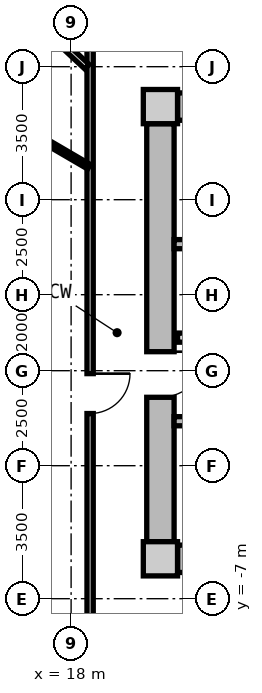
"""IFC4 building model, lengths in metres.
Left out: names, types, materials, properties, quantities, classifications, styles, units other than length and angle.
Written with IfcOpenShell. Run it as: python <this file> out.ifc"""

import sys

from ifc_helpers import new_model, si_unit, direction, frame, frame_2d, origin, origin_2d, place, context, subcontext, project, spatial, rectangle, extrude, source, transform, mapped, element, fill, save


model = new_model("IFC4")
c1 = context("Model", 3, precision=1e-05, world=origin(), true_north=direction((0.0, 1.0)))
c2 = subcontext(c1, "Body", "Model", "MODEL_VIEW")
j1 = project(units=[si_unit("LENGTHUNIT", "METRE"), si_unit("PLANEANGLEUNIT", "RADIAN")], contexts=[c1])
p1 = place(None, origin())
s1 = spatial("IfcSite", under=j1, at=p1, CompositionType="ELEMENT")
p2 = place(p1, origin())
s2 = spatial("IfcBuilding", under=s1, at=p2, CompositionType="ELEMENT")
p3 = place(p2, frame((0.0, 0.0, 93.2)))
s3 = spatial("IfcBuildingStorey", under=s2, at=p3, CompositionType="ELEMENT", Elevation=93.2)
m1 = source(origin(), c2, "Body", "SweptSolid", [
    extrude(rectangle(XDim=0.9, YDim=0.9, at=origin_2d()), origin(), (0.0, 0.0, 1.0), 3.05),
])
for number, where, z_axis, x_axis in (
    (1, (20.35, -5.95, 0.0), (0.0, 0.0, 1.0), (1.0, 0.0, 0.0)),
    (2, (20.35, 5.95, 0.0), (0.0, 0.0, 1.0), (1.0, 0.0, 0.0)),
):
    element("IfcColumn", number, at=place(p3, frame(where, z_axis=z_axis, x_axis=x_axis)), inside=s3, PredefinedType="COLUMN", context=c2, shape_type="MappedRepresentation", body=[
        mapped(m1, transform((0.0, 0.0, 0.0), x_axis=(1.0, 0.0, 0.0), y_axis=(0.0, 1.0, 0.0), z_axis=(0.0, 0.0, 1.0), scale=1.0)),
    ])
m2 = source(origin(), c2, "Body", "SweptSolid", [
    extrude(rectangle(XDim=14.4, YDim=0.72, at=frame_2d((7.2, 0.0))), origin(), (0.0, 0.0, 1.0), 2.79),
])
for number, where, z_axis, x_axis in (
    (3, (20.8, 5.95, 0.0), (0.0, 0.0, 1.0), (1.0, 0.0, 0.0)),
    (4, (35.2, -5.95, 0.0), (0.0, 0.0, 1.0), (-1.0, 0.0, 0.0)),
):
    element("IfcWall", number, at=place(p3, frame(where, z_axis=z_axis, x_axis=x_axis)), inside=s3, PredefinedType="SHEAR", context=c2, shape_type="MappedRepresentation", body=[
        mapped(m2, transform((0.0, 0.0, 0.0), x_axis=(1.0, 0.0, 0.0), y_axis=(0.0, 1.0, 0.0), z_axis=(0.0, 0.0, 1.0), scale=1.0)),
    ])
m3 = source(origin(), c2, "Body", "SweptSolid", [
    extrude(rectangle(XDim=11.0, YDim=0.72, at=frame_2d((5.5, 0.0))), origin(), (0.0, 0.0, 1.0), 2.79),
])
p4 = place(p3, frame((20.35, -5.5, 0.0), z_axis=(0.0, 0.0, 1.0), x_axis=(0.0, 1.0, 0.0)))
e5 = element("IfcWall", 5, at=p4, inside=s3, PredefinedType="SHEAR", context=c2, shape_type="MappedRepresentation", body=[
    mapped(m3, transform((0.0, 0.0, 0.0), x_axis=(1.0, 0.0, 0.0), y_axis=(0.0, 1.0, 0.0), z_axis=(0.0, 0.0, 1.0), scale=1.0)),
])
p5 = place(p4, frame((3.8, 0.0, 0.0)))
e6 = element("IfcOpeningElement", 6, at=p5, cuts=e5, PredefinedType="OPENING", context=c2, shape_type="SweptSolid", body=[
    extrude(rectangle(XDim=1.2, YDim=2.15, at=frame_2d((0.6, 1.075))), frame((0.0, 0.37, 0.0), z_axis=(0.0, -1.0, 0.0), x_axis=(1.0, 0.0, 0.0)), (0.0, 0.0, 1.0), 0.74),
])
m4 = source(origin(), c2, "Body", "SweptSolid", [
    extrude(rectangle(XDim=7.83, YDim=0.24, at=frame_2d((3.915, 0.0))), origin(), (0.0, 0.0, 1.0), 2.79),
])
p6 = place(p3, frame((20.71, 2.33, 0.0), z_axis=(0.0, 0.0, 1.0), x_axis=(1.0, 0.0, 0.0)))
e7 = element("IfcWall", 7, at=p6, inside=s3, PredefinedType="PARTITIONING", context=c2, shape_type="MappedRepresentation", body=[
    mapped(m4, transform((0.0, 0.0, 0.0), x_axis=(1.0, 0.0, 0.0), y_axis=(0.0, 1.0, 0.0), z_axis=(0.0, 0.0, 1.0), scale=1.0)),
])
p7 = place(p3, frame((20.71, -2.33, 0.0), z_axis=(0.0, 0.0, 1.0), x_axis=(1.0, 0.0, 0.0)))
e8 = element("IfcWall", 8, at=p7, inside=s3, PredefinedType="PARTITIONING", context=c2, shape_type="MappedRepresentation", body=[
    mapped(m4, transform((0.0, 0.0, 0.0), x_axis=(1.0, 0.0, 0.0), y_axis=(0.0, 1.0, 0.0), z_axis=(0.0, 0.0, 1.0), scale=1.0)),
])
p8 = place(p7, frame((0.95, 0.0, 0.0)))
e9 = element("IfcOpeningElement", 9, at=p8, cuts=e8, PredefinedType="OPENING", context=c2, shape_type="SweptSolid", body=[
    extrude(rectangle(XDim=1.1, YDim=2.15, at=frame_2d((0.55, 1.075))), frame((0.0, 0.13, 0.0), z_axis=(0.0, -1.0, 0.0), x_axis=(1.0, 0.0, 0.0)), (0.0, 0.0, 1.0), 0.26),
])
m5 = source(origin(), c2, "Body", "SweptSolid", [
    extrude(rectangle(XDim=7.62, YDim=0.24, at=frame_2d((3.81, 0.0))), origin(), (0.0, 0.0, 1.0), 2.775),
])
p9 = place(p3, frame((20.8, -0.13, 0.0), z_axis=(0.0, 0.0, 1.0), x_axis=(1.0, 0.0, 0.0)))
e10 = element("IfcWall", 10, at=p9, inside=s3, PredefinedType="PARTITIONING", context=c2, shape_type="MappedRepresentation", body=[
    mapped(m5, transform((0.0, 0.0, 0.0), x_axis=(1.0, 0.0, 0.0), y_axis=(0.0, 1.0, 0.0), z_axis=(0.0, 0.0, 1.0), scale=1.0)),
])
p10 = place(p9, frame((6.22, 0.0, 0.0)))
e11 = element("IfcOpeningElement", 11, at=p10, cuts=e10, PredefinedType="OPENING", context=c2, shape_type="SweptSolid", body=[
    extrude(rectangle(XDim=1.0, YDim=2.1, at=frame_2d((0.5, 1.05))), frame((0.0, 0.13, 0.0), z_axis=(0.0, -1.0, 0.0), x_axis=(1.0, 0.0, 0.0)), (0.0, 0.0, 1.0), 0.26),
])
p11 = place(p9, frame((2.4, 0.0, 0.0)))
e12 = element("IfcOpeningElement", 12, at=p11, cuts=e10, PredefinedType="OPENING", context=c2, shape_type="SweptSolid", body=[
    extrude(rectangle(XDim=1.0, YDim=2.1, at=frame_2d((0.5, 1.05))), frame((0.0, 0.13, 0.0), z_axis=(0.0, -1.0, 0.0), x_axis=(1.0, 0.0, 0.0)), (0.0, 0.0, 1.0), 0.26),
])
m6 = source(origin(), c2, "Body", "SweptSolid", [
    extrude(rectangle(XDim=15.6, YDim=0.165, at=frame_2d((7.8, 0.0))), origin(), (0.0, 0.0, 1.0), 2.775),
])
p12 = place(p3, frame((18.5, -7.8, 0.0), z_axis=(0.0, 0.0, 1.0), x_axis=(0.0, 1.0, 0.0)))
e13 = element("IfcWall", 13, at=p12, inside=s3, PredefinedType="PARTITIONING", context=c2, shape_type="MappedRepresentation", body=[
    mapped(m6, transform((0.0, 0.0, 0.0), x_axis=(1.0, 0.0, 0.0), y_axis=(0.0, 1.0, 0.0), z_axis=(0.0, 0.0, 1.0), scale=1.0)),
])
p13 = place(p12, frame((5.673, 0.0, 0.0)))
e14 = element("IfcOpeningElement", 14, at=p13, cuts=e13, PredefinedType="OPENING", context=c2, shape_type="SweptSolid", body=[
    extrude(rectangle(XDim=1.05, YDim=2.15, at=frame_2d((0.525, 1.075))), frame((0.0, 0.093, 0.0), z_axis=(0.0, -1.0, 0.0), x_axis=(1.0, 0.0, 0.0)), (0.0, 0.0, 1.0), 0.185),
])
m7 = source(origin(), c2, "Body", "SweptSolid", [
    extrude(rectangle(XDim=7.482, YDim=0.165, at=frame_2d((3.741, 0.0))), origin(), (0.0, 0.0, 1.0), 2.275),
])
p14 = place(p3, frame((18.42, 6.998, 0.0), z_axis=(0.0, 0.0, 1.0), x_axis=(-0.732508698043, 0.680757671489, 0.0)))
e15 = element("IfcWall", 15, at=p14, inside=s3, PredefinedType="PARTITIONING", context=c2, shape_type="MappedRepresentation", body=[
    mapped(m7, transform((0.0, 0.0, 0.0), x_axis=(1.0, 0.0, 0.0), y_axis=(0.0, 1.0, 0.0), z_axis=(0.0, 0.0, 1.0), scale=1.0)),
])
m8 = source(origin(), c2, "Body", "SweptSolid", [
    extrude(rectangle(XDim=3.069, YDim=0.14, at=frame_2d((1.535, 0.0))), origin(), (0.0, 0.0, 1.0), 2.775),
])
p15 = place(p3, frame((18.47, 4.368, 0.0), z_axis=(0.0, 0.0, 1.0), x_axis=(-0.863524911282, 0.504306184371, 0.0)))
e16 = element("IfcWall", 16, at=p15, inside=s3, PredefinedType="PARTITIONING", context=c2, shape_type="MappedRepresentation", body=[
    mapped(m8, transform((0.0, 0.0, 0.0), x_axis=(1.0, 0.0, 0.0), y_axis=(0.0, 1.0, 0.0), z_axis=(0.0, 0.0, 1.0), scale=1.0)),
])
m9 = source(origin(), c2, "Body", "SweptSolid", [
    extrude(rectangle(XDim=1.2, YDim=2.15, at=frame_2d((0.6, 1.075))), frame((0.0, 0.025, 0.0), z_axis=(0.0, -1.0, 0.0), x_axis=(1.0, 0.0, 0.0)), (0.0, 0.0, 1.0), 0.05),
])
p16 = place(p5, frame((1.2, 0.0, 0.0), z_axis=(0.0, 0.0, 1.0), x_axis=(-1.0, 0.0, 0.0)))
e17 = element("IfcDoor", 17, at=p16, inside=s3, OperationType="SINGLE_SWING_LEFT", PredefinedType="DOOR", context=c2, shape_type="MappedRepresentation", body=[
    mapped(m9, transform((0.0, 0.0, 0.0), x_axis=(1.0, 0.0, 0.0), y_axis=(0.0, 1.0, 0.0), z_axis=(0.0, 0.0, 1.0), scale=1.0)),
])
fill(e6, e17)
m10 = source(origin(), c2, "Body", "SweptSolid", [
    extrude(rectangle(XDim=1.05, YDim=2.15, at=frame_2d((0.525, 1.075))), frame((0.0, 0.025, 0.0), z_axis=(0.0, -1.0, 0.0), x_axis=(1.0, 0.0, 0.0)), (0.0, 0.0, 1.0), 0.05),
])
p17 = place(p13, frame((1.05, 0.0, 0.0), z_axis=(0.0, 0.0, 1.0), x_axis=(-1.0, 0.0, 0.0)))
e18 = element("IfcDoor", 18, at=p17, inside=s3, OperationType="SINGLE_SWING_LEFT", PredefinedType="DOOR", context=c2, shape_type="MappedRepresentation", body=[
    mapped(m10, transform((0.0, 0.0, 0.0), x_axis=(1.0, 0.0, 0.0), y_axis=(0.0, 1.0, 0.0), z_axis=(0.0, 0.0, 1.0), scale=1.0)),
])
fill(e14, e18)
save(model, sys.argv[1])
